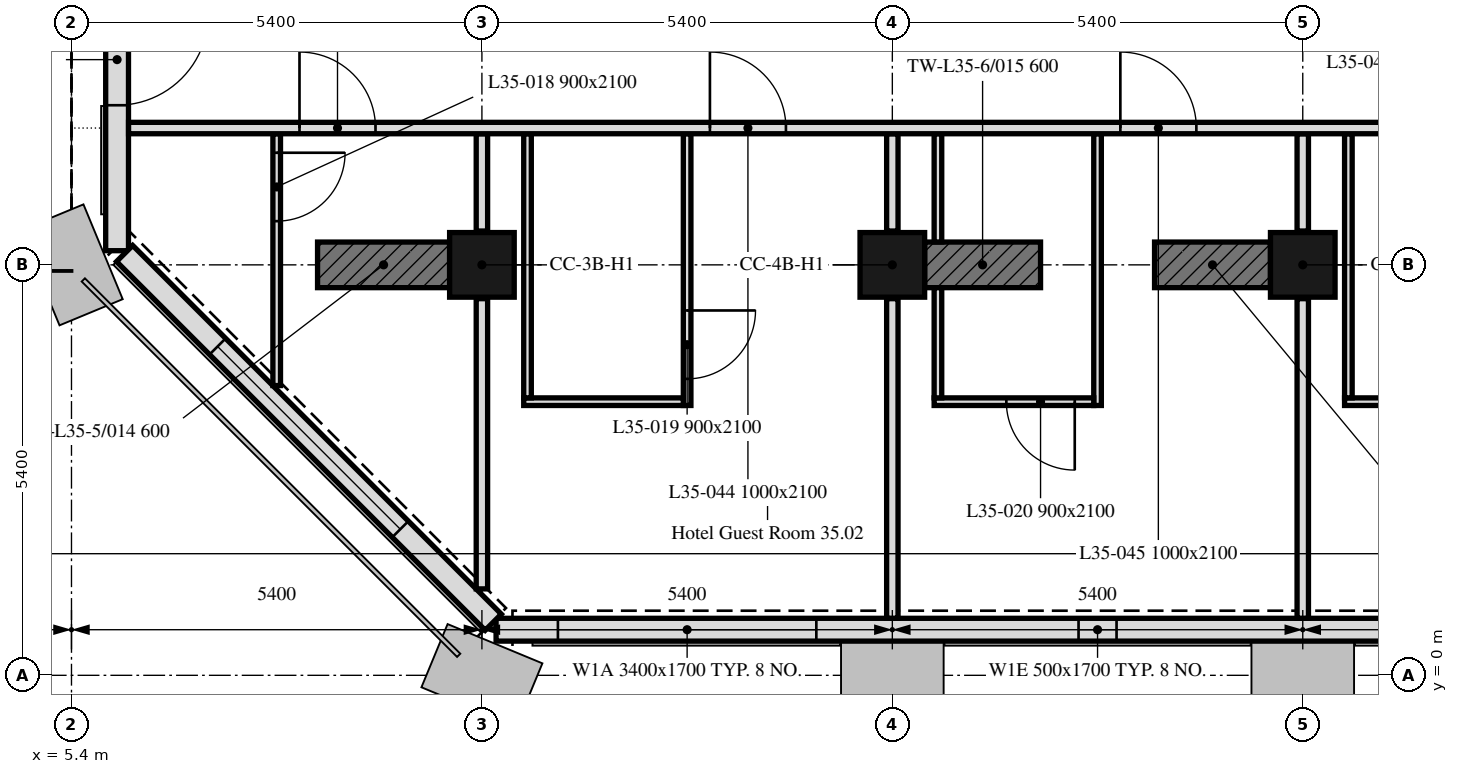
"""IFC4 building model, lengths in metres.
Left out: names, types, materials, properties, quantities, classifications, styles, units other than length and angle.
Written with IfcOpenShell. Run it as: python <this file> out.ifc"""

import sys

from ifc_helpers import new_model, si_unit, direction, frame, frame_2d, origin, origin_2d, place, context, subcontext, project, spatial, rectangle, extrude, element, fill, save


model = new_model("IFC4")
c1 = context("Model", 3, precision=1e-05, world=origin(), true_north=direction((0.0, 1.0)))
c2 = subcontext(c1, "Body", "Model", "MODEL_VIEW")
j1 = project(units=[si_unit("LENGTHUNIT", "METRE"), si_unit("PLANEANGLEUNIT", "RADIAN")], contexts=[c1])
p1 = place(None, origin())
s1 = spatial("IfcSite", under=j1, at=p1, CompositionType="ELEMENT")
p2 = place(p1, origin())
s2 = spatial("IfcBuilding", under=s1, at=p2, CompositionType="ELEMENT")
p3 = place(p2, frame((0.0, 0.0, 152.8)))
s3 = spatial("IfcBuildingStorey", under=s2, at=p3, CompositionType="ELEMENT", Elevation=152.8)
for number, where, z_axis, x_axis in (
    (1, (10.8, 5.4, 0.0), (0.0, 0.0, 1.0), (1.0, 0.0, 0.0)),
    (2, (16.2, 5.4, 0.0), (0.0, 0.0, 1.0), (1.0, 0.0, 0.0)),
    (3, (21.6, 5.4, 0.0), (0.0, 0.0, 1.0), (1.0, 0.0, 0.0)),
):
    element("IfcColumn", number, at=place(p3, frame(where, z_axis=z_axis, x_axis=x_axis)), inside=s3, PredefinedType="COLUMN", context=c2, shape_type="SweptSolid", body=[
        extrude(rectangle(XDim=0.85, YDim=0.85, at=origin_2d()), origin(), (0.0, 0.0, 1.0), 3.0),
    ])
p4 = place(p3, frame((8.637, 5.4, 0.0), z_axis=(0.0, 0.0, 1.0), x_axis=(1.0, 0.0, 0.0)))
e4 = element("IfcWall", 4, at=p4, inside=s3, PredefinedType="SHEAR", context=c2, shape_type="SweptSolid", body=[
    extrude(rectangle(XDim=1.738, YDim=0.6, at=frame_2d((0.869, 0.0))), origin(), (0.0, 0.0, 1.0), 3.0),
])
p5 = place(p3, frame((16.625, 5.4, 0.0), z_axis=(0.0, 0.0, 1.0), x_axis=(1.0, 0.0, 0.0)))
e5 = element("IfcWall", 5, at=p5, inside=s3, PredefinedType="SHEAR", context=c2, shape_type="SweptSolid", body=[
    extrude(rectangle(XDim=1.525, YDim=0.6, at=frame_2d((0.762, 0.0))), origin(), (0.0, 0.0, 1.0), 3.0),
])
p6 = place(p3, frame((19.65, 5.4, 0.0), z_axis=(0.0, 0.0, 1.0), x_axis=(1.0, 0.0, 0.0)))
e6 = element("IfcWall", 6, at=p6, inside=s3, PredefinedType="SHEAR", context=c2, shape_type="SweptSolid", body=[
    extrude(rectangle(XDim=1.525, YDim=0.6, at=frame_2d((0.763, 0.0))), origin(), (0.0, 0.0, 1.0), 3.0),
])
p7 = place(p3, frame((10.986, 0.6, 0.0), z_axis=(0.0, 0.0, 1.0), x_axis=(1.0, 0.0, 0.0)))
e7 = element("IfcWall", 7, at=p7, inside=s3, PredefinedType="SOLIDWALL", context=c2, shape_type="SweptSolid", body=[
    extrude(rectangle(XDim=32.027, YDim=0.3, at=frame_2d((16.014, 0.0))), origin(), (0.0, 0.0, 1.0), 3.0),
])
p8 = place(p7, frame((0.814, 0.0, 0.9)))
e8 = element("IfcOpeningElement", 8, at=p8, cuts=e7, PredefinedType="OPENING", context=c2, shape_type="SweptSolid", body=[
    extrude(rectangle(XDim=3.4, YDim=1.7, at=frame_2d((1.7, 0.85))), frame((0.0, 0.16, 0.0), z_axis=(0.0, -1.0, 0.0), x_axis=(1.0, 0.0, 0.0)), (0.0, 0.0, 1.0), 0.32),
])
p9 = place(p7, frame((7.664, 0.0, 0.9)))
e9 = element("IfcOpeningElement", 9, at=p9, cuts=e7, PredefinedType="OPENING", context=c2, shape_type="SweptSolid", body=[
    extrude(rectangle(XDim=0.5, YDim=1.7, at=frame_2d((0.25, 0.85))), frame((0.0, 0.16, 0.0), z_axis=(0.0, -1.0, 0.0), x_axis=(1.0, 0.0, 0.0)), (0.0, 0.0, 1.0), 0.32),
])
p10 = place(p7, frame((13.064, 0.0, 0.9)))
e10 = element("IfcOpeningElement", 10, at=p10, cuts=e7, PredefinedType="OPENING", context=c2, shape_type="SweptSolid", body=[
    extrude(rectangle(XDim=0.5, YDim=1.7, at=frame_2d((0.25, 0.85))), frame((0.0, 0.16, 0.0), z_axis=(0.0, -1.0, 0.0), x_axis=(1.0, 0.0, 0.0)), (0.0, 0.0, 1.0), 0.32),
])
p11 = place(p7, frame((18.464, 0.0, 0.9)))
e11 = element("IfcOpeningElement", 11, at=p11, cuts=e7, PredefinedType="OPENING", context=c2, shape_type="SweptSolid", body=[
    extrude(rectangle(XDim=0.5, YDim=1.7, at=frame_2d((0.25, 0.85))), frame((0.0, 0.16, 0.0), z_axis=(0.0, -1.0, 0.0), x_axis=(1.0, 0.0, 0.0)), (0.0, 0.0, 1.0), 0.32),
])
p12 = place(p7, frame((23.864, 0.0, 0.9)))
e12 = element("IfcOpeningElement", 12, at=p12, cuts=e7, PredefinedType="OPENING", context=c2, shape_type="SweptSolid", body=[
    extrude(rectangle(XDim=0.5, YDim=1.7, at=frame_2d((0.25, 0.85))), frame((0.0, 0.16, 0.0), z_axis=(0.0, -1.0, 0.0), x_axis=(1.0, 0.0, 0.0)), (0.0, 0.0, 1.0), 0.32),
])
p13 = place(p7, frame((28.164, 0.0, 0.9)))
e13 = element("IfcOpeningElement", 13, at=p13, cuts=e7, PredefinedType="OPENING", context=c2, shape_type="SweptSolid", body=[
    extrude(rectangle(XDim=1.1, YDim=1.7, at=frame_2d((0.55, 0.85))), frame((0.0, 0.16, 0.0), z_axis=(0.0, -1.0, 0.0), x_axis=(1.0, 0.0, 0.0)), (0.0, 0.0, 1.0), 0.32),
])
p14 = place(p3, frame((6.0, 16.2, 0.0), z_axis=(0.0, 0.0, 1.0), x_axis=(0.0, -1.0, 0.0)))
e14 = element("IfcWall", 14, at=p14, inside=s3, PredefinedType="SOLIDWALL", context=c2, shape_type="SweptSolid", body=[
    extrude(rectangle(XDim=10.614, YDim=0.3, at=frame_2d((5.307, 0.0))), origin(), (0.0, 0.0, 1.0), 3.0),
])
p15 = place(p14, frame((1.8, 0.0, 0.0)))
e15 = element("IfcOpeningElement", 15, at=p15, cuts=e14, PredefinedType="OPENING", context=c2, shape_type="SweptSolid", body=[
    extrude(rectangle(XDim=1.8, YDim=2.4, at=frame_2d((0.9, 1.2))), frame((0.0, 0.16, 0.0), z_axis=(0.0, -1.0, 0.0), x_axis=(1.0, 0.0, 0.0)), (0.0, 0.0, 1.0), 0.32),
])
p16 = place(p14, frame((7.5, 0.0, 0.0)))
e16 = element("IfcOpeningElement", 16, at=p16, cuts=e14, PredefinedType="OPENING", context=c2, shape_type="SweptSolid", body=[
    extrude(rectangle(XDim=1.2, YDim=2.4, at=frame_2d((0.6, 1.2))), frame((0.0, 0.16, 0.0), z_axis=(0.0, -1.0, 0.0), x_axis=(1.0, 0.0, 0.0)), (0.0, 0.0, 1.0), 0.32),
])
p17 = place(p3, frame((6.099, 5.55, 0.0), z_axis=(0.0, 0.0, 1.0), x_axis=(0.707106781187, -0.707106781187, 0.0)))
e17 = element("IfcWall", 17, at=p17, inside=s3, PredefinedType="SOLIDWALL", context=c2, shape_type="SweptSolid", body=[
    extrude(rectangle(XDim=6.86, YDim=0.3, at=frame_2d((3.43, 0.0))), origin(), (0.0, 0.0, 1.0), 3.0),
])
p18 = place(p17, frame((1.73, 0.0, 0.9)))
e18 = element("IfcOpeningElement", 18, at=p18, cuts=e17, PredefinedType="OPENING", context=c2, shape_type="SweptSolid", body=[
    extrude(rectangle(XDim=3.4, YDim=1.7, at=frame_2d((1.7, 0.85))), frame((0.0, 0.16, 0.0), z_axis=(0.0, -1.0, 0.0), x_axis=(1.0, 0.0, 0.0)), (0.0, 0.0, 1.0), 0.32),
])
p19 = place(p3, frame((8.1, 7.125, 0.0), z_axis=(0.0, 0.0, 1.0), x_axis=(0.0, -1.0, 0.0)))
e19 = element("IfcWall", 19, at=p19, inside=s3, PredefinedType="PARTITIONING", context=c2, shape_type="SweptSolid", body=[
    extrude(rectangle(XDim=3.313, YDim=0.1, at=frame_2d((1.656, 0.0))), origin(), (0.0, 0.0, 1.0), 3.0),
])
p20 = place(p19, frame((0.25, 0.0, 0.0)))
e20 = element("IfcOpeningElement", 20, at=p20, cuts=e19, PredefinedType="OPENING", context=c2, shape_type="SweptSolid", body=[
    extrude(rectangle(XDim=0.9, YDim=2.1, at=frame_2d((0.45, 1.05))), frame((0.0, 0.05, 0.0), z_axis=(0.0, -1.0, 0.0), x_axis=(1.0, 0.0, 0.0)), (0.0, 0.0, 1.0), 0.1),
])
p21 = place(p3, frame((10.8, 1.137, 0.0), z_axis=(0.0, 0.0, 1.0), x_axis=(0.0, 1.0, 0.0)))
e21 = element("IfcWall", 21, at=p21, inside=s3, PredefinedType="PARTITIONING", context=c2, shape_type="SweptSolid", body=[
    extrude(rectangle(XDim=3.818, YDim=0.15, at=frame_2d((1.909, 0.0))), origin(), (0.0, 0.0, 1.0), 3.0),
])
p22 = place(p3, frame((10.8, 5.845, 0.0), z_axis=(0.0, 0.0, 1.0), x_axis=(0.0, 1.0, 0.0)))
e22 = element("IfcWall", 22, at=p22, inside=s3, PredefinedType="PARTITIONING", context=c2, shape_type="SweptSolid", body=[
    extrude(rectangle(XDim=1.28, YDim=0.15, at=frame_2d((0.64, 0.0))), origin(), (0.0, 0.0, 1.0), 3.0),
])
p23 = place(p3, frame((16.2, 0.751, 0.0), z_axis=(0.0, 0.0, 1.0), x_axis=(0.0, 1.0, 0.0)))
e23 = element("IfcWall", 23, at=p23, inside=s3, PredefinedType="PARTITIONING", context=c2, shape_type="SweptSolid", body=[
    extrude(rectangle(XDim=4.204, YDim=0.15, at=frame_2d((2.102, 0.0))), origin(), (0.0, 0.0, 1.0), 2.4),
])
p24 = place(p3, frame((16.2, 5.845, 0.0), z_axis=(0.0, 0.0, 1.0), x_axis=(0.0, 1.0, 0.0)))
e24 = element("IfcWall", 24, at=p24, inside=s3, PredefinedType="PARTITIONING", context=c2, shape_type="SweptSolid", body=[
    extrude(rectangle(XDim=1.28, YDim=0.15, at=frame_2d((0.64, 0.0))), origin(), (0.0, 0.0, 1.0), 2.4),
])
p25 = place(p3, frame((13.5, 7.125, 0.0), z_axis=(0.0, 0.0, 1.0), x_axis=(0.0, -1.0, 0.0)))
e25 = element("IfcWall", 25, at=p25, inside=s3, PredefinedType="PARTITIONING", context=c2, shape_type="SweptSolid", body=[
    extrude(rectangle(XDim=3.575, YDim=0.1, at=frame_2d((1.788, 0.0))), origin(), (0.0, 0.0, 1.0), 3.0),
])
p26 = place(p25, frame((2.325, 0.0, 0.0)))
e26 = element("IfcOpeningElement", 26, at=p26, cuts=e25, PredefinedType="OPENING", context=c2, shape_type="SweptSolid", body=[
    extrude(rectangle(XDim=0.9, YDim=2.1, at=frame_2d((0.45, 1.05))), frame((0.0, 0.05, 0.0), z_axis=(0.0, -1.0, 0.0), x_axis=(1.0, 0.0, 0.0)), (0.0, 0.0, 1.0), 0.1),
])
p27 = place(p3, frame((13.45, 3.6, 0.0), z_axis=(0.0, 0.0, 1.0), x_axis=(-1.0, 0.0, 0.0)))
e27 = element("IfcWall", 27, at=p27, inside=s3, PredefinedType="PARTITIONING", context=c2, shape_type="SweptSolid", body=[
    extrude(rectangle(XDim=2.1, YDim=0.1, at=frame_2d((1.05, 0.0))), origin(), (0.0, 0.0, 1.0), 3.0),
])
p28 = place(p3, frame((11.4, 3.65, 0.0), z_axis=(0.0, 0.0, 1.0), x_axis=(0.0, 1.0, 0.0)))
e28 = element("IfcWall", 28, at=p28, inside=s3, PredefinedType="PARTITIONING", context=c2, shape_type="SweptSolid", body=[
    extrude(rectangle(XDim=3.475, YDim=0.1, at=frame_2d((1.738, 0.0))), origin(), (0.0, 0.0, 1.0), 3.0),
])
p29 = place(p3, frame((21.6, 0.751, 0.0), z_axis=(0.0, 0.0, 1.0), x_axis=(0.0, 1.0, 0.0)))
e29 = element("IfcWall", 29, at=p29, inside=s3, PredefinedType="PARTITIONING", context=c2, shape_type="SweptSolid", body=[
    extrude(rectangle(XDim=4.204, YDim=0.15, at=frame_2d((2.102, 0.0))), origin(), (0.0, 0.0, 1.0), 2.4),
])
p30 = place(p3, frame((21.6, 5.845, 0.0), z_axis=(0.0, 0.0, 1.0), x_axis=(0.0, 1.0, 0.0)))
e30 = element("IfcWall", 30, at=p30, inside=s3, PredefinedType="PARTITIONING", context=c2, shape_type="SweptSolid", body=[
    extrude(rectangle(XDim=1.28, YDim=0.15, at=frame_2d((0.64, 0.0))), origin(), (0.0, 0.0, 1.0), 2.4),
])
p31 = place(p3, frame((18.9, 7.125, 0.0), z_axis=(0.0, 0.0, 1.0), x_axis=(0.0, -1.0, 0.0)))
e31 = element("IfcWall", 31, at=p31, inside=s3, PredefinedType="PARTITIONING", context=c2, shape_type="SweptSolid", body=[
    extrude(rectangle(XDim=3.575, YDim=0.1, at=frame_2d((1.788, 0.0))), origin(), (0.0, 0.0, 1.0), 3.0),
])
p32 = place(p3, frame((18.85, 3.6, 0.0), z_axis=(0.0, 0.0, 1.0), x_axis=(-1.0, 0.0, 0.0)))
e32 = element("IfcWall", 32, at=p32, inside=s3, PredefinedType="PARTITIONING", context=c2, shape_type="SweptSolid", body=[
    extrude(rectangle(XDim=2.1, YDim=0.1, at=frame_2d((1.05, 0.0))), origin(), (0.0, 0.0, 1.0), 3.0),
])
p33 = place(p32, frame((0.25, 0.0, 0.0)))
e33 = element("IfcOpeningElement", 33, at=p33, cuts=e32, PredefinedType="OPENING", context=c2, shape_type="SweptSolid", body=[
    extrude(rectangle(XDim=0.9, YDim=2.1, at=frame_2d((0.45, 1.05))), frame((0.0, 0.05, 0.0), z_axis=(0.0, -1.0, 0.0), x_axis=(1.0, 0.0, 0.0)), (0.0, 0.0, 1.0), 0.1),
])
p34 = place(p3, frame((16.8, 3.65, 0.0), z_axis=(0.0, 0.0, 1.0), x_axis=(0.0, 1.0, 0.0)))
e34 = element("IfcWall", 34, at=p34, inside=s3, PredefinedType="PARTITIONING", context=c2, shape_type="SweptSolid", body=[
    extrude(rectangle(XDim=1.449, YDim=0.1, at=frame_2d((0.725, 0.0))), origin(), (0.0, 0.0, 1.0), 3.0),
])
p35 = place(p3, frame((16.8, 5.701, 0.0), z_axis=(0.0, 0.0, 1.0), x_axis=(0.0, 1.0, 0.0)))
e35 = element("IfcWall", 35, at=p35, inside=s3, PredefinedType="PARTITIONING", context=c2, shape_type="SweptSolid", body=[
    extrude(rectangle(XDim=1.424, YDim=0.1, at=frame_2d((0.712, 0.0))), origin(), (0.0, 0.0, 1.0), 3.0),
])
p36 = place(p3, frame((24.25, 3.6, 0.0), z_axis=(0.0, 0.0, 1.0), x_axis=(-1.0, 0.0, 0.0)))
e36 = element("IfcWall", 36, at=p36, inside=s3, PredefinedType="PARTITIONING", context=c2, shape_type="SweptSolid", body=[
    extrude(rectangle(XDim=2.1, YDim=0.1, at=frame_2d((1.05, 0.0))), origin(), (0.0, 0.0, 1.0), 3.0),
])
p37 = place(p3, frame((22.2, 3.65, 0.0), z_axis=(0.0, 0.0, 1.0), x_axis=(0.0, 1.0, 0.0)))
e37 = element("IfcWall", 37, at=p37, inside=s3, PredefinedType="PARTITIONING", context=c2, shape_type="SweptSolid", body=[
    extrude(rectangle(XDim=3.475, YDim=0.1, at=frame_2d((1.738, 0.0))), origin(), (0.0, 0.0, 1.0), 3.0),
])
p38 = place(p3, frame((6.151, 7.2, 0.0), z_axis=(0.0, 0.0, 1.0), x_axis=(1.0, 0.0, 0.0)))
e38 = element("IfcWall", 38, at=p38, inside=s3, PredefinedType="PARTITIONING", context=c2, shape_type="SweptSolid", body=[
    extrude(rectangle(XDim=41.698, YDim=0.15, at=frame_2d((20.849, 0.0))), origin(), (0.0, 0.0, 1.0), 2.4),
])
p39 = place(p38, frame((2.249, 0.0, 0.0)))
e39 = element("IfcOpeningElement", 39, at=p39, cuts=e38, PredefinedType="OPENING", context=c2, shape_type="SweptSolid", body=[
    extrude(rectangle(XDim=1.0, YDim=2.1, at=frame_2d((0.5, 1.05))), frame((0.0, 0.075, 0.0), z_axis=(0.0, -1.0, 0.0), x_axis=(1.0, 0.0, 0.0)), (0.0, 0.0, 1.0), 0.15),
])
p40 = place(p38, frame((7.649, 0.0, 0.0)))
e40 = element("IfcOpeningElement", 40, at=p40, cuts=e38, PredefinedType="OPENING", context=c2, shape_type="SweptSolid", body=[
    extrude(rectangle(XDim=1.0, YDim=2.1, at=frame_2d((0.5, 1.05))), frame((0.0, 0.075, 0.0), z_axis=(0.0, -1.0, 0.0), x_axis=(1.0, 0.0, 0.0)), (0.0, 0.0, 1.0), 0.15),
])
p41 = place(p38, frame((13.049, 0.0, 0.0)))
e41 = element("IfcOpeningElement", 41, at=p41, cuts=e38, PredefinedType="OPENING", context=c2, shape_type="SweptSolid", body=[
    extrude(rectangle(XDim=1.0, YDim=2.1, at=frame_2d((0.5, 1.05))), frame((0.0, 0.075, 0.0), z_axis=(0.0, -1.0, 0.0), x_axis=(1.0, 0.0, 0.0)), (0.0, 0.0, 1.0), 0.15),
])
p42 = place(p38, frame((18.449, 0.0, 0.0)))
e42 = element("IfcOpeningElement", 42, at=p42, cuts=e38, PredefinedType="OPENING", context=c2, shape_type="SweptSolid", body=[
    extrude(rectangle(XDim=1.0, YDim=2.1, at=frame_2d((0.5, 1.05))), frame((0.0, 0.075, 0.0), z_axis=(0.0, -1.0, 0.0), x_axis=(1.0, 0.0, 0.0)), (0.0, 0.0, 1.0), 0.15),
])
p43 = place(p38, frame((23.849, 0.0, 0.0)))
e43 = element("IfcOpeningElement", 43, at=p43, cuts=e38, PredefinedType="OPENING", context=c2, shape_type="SweptSolid", body=[
    extrude(rectangle(XDim=1.0, YDim=2.1, at=frame_2d((0.5, 1.05))), frame((0.0, 0.075, 0.0), z_axis=(0.0, -1.0, 0.0), x_axis=(1.0, 0.0, 0.0)), (0.0, 0.0, 1.0), 0.15),
])
p44 = place(p38, frame((29.249, 0.0, 0.0)))
e44 = element("IfcOpeningElement", 44, at=p44, cuts=e38, PredefinedType="OPENING", context=c2, shape_type="SweptSolid", body=[
    extrude(rectangle(XDim=1.0, YDim=2.1, at=frame_2d((0.5, 1.05))), frame((0.0, 0.075, 0.0), z_axis=(0.0, -1.0, 0.0), x_axis=(1.0, 0.0, 0.0)), (0.0, 0.0, 1.0), 0.15),
])
p45 = place(p38, frame((37.954, 0.0, 0.0)))
e45 = element("IfcOpeningElement", 45, at=p45, cuts=e38, PredefinedType="OPENING", context=c2, shape_type="SweptSolid", body=[
    extrude(rectangle(XDim=1.0, YDim=2.1, at=frame_2d((0.5, 1.05))), frame((0.0, 0.075, 0.0), z_axis=(0.0, -1.0, 0.0), x_axis=(1.0, 0.0, 0.0)), (0.0, 0.0, 1.0), 0.15),
])
p46 = place(p16, origin())
e46 = element("IfcDoor", 46, at=p46, inside=s3, OperationType="SINGLE_SWING_LEFT", PredefinedType="DOOR", context=c2, shape_type="SweptSolid", body=[
    extrude(rectangle(XDim=1.2, YDim=2.4, at=frame_2d((0.6, 1.2))), frame((0.0, 0.025, 0.0), z_axis=(0.0, -1.0, 0.0), x_axis=(1.0, 0.0, 0.0)), (0.0, 0.0, 1.0), 0.05),
])
fill(e16, e46)
p47 = place(p8, origin())
e47 = element("IfcWindow", 47, at=p47, inside=s3, PartitioningType="SINGLE_PANEL", PredefinedType="WINDOW", context=c2, shape_type="SweptSolid", body=[
    extrude(rectangle(XDim=3.4, YDim=1.7, at=frame_2d((1.7, 0.85))), frame((0.0, 0.03, 0.0), z_axis=(0.0, -1.0, 0.0), x_axis=(1.0, 0.0, 0.0)), (0.0, 0.0, 1.0), 0.06),
])
fill(e8, e47)
p48 = place(p9, origin())
e48 = element("IfcWindow", 48, at=p48, inside=s3, PartitioningType="SINGLE_PANEL", PredefinedType="WINDOW", context=c2, shape_type="SweptSolid", body=[
    extrude(rectangle(XDim=0.5, YDim=1.7, at=frame_2d((0.25, 0.85))), frame((0.0, 0.03, 0.0), z_axis=(0.0, -1.0, 0.0), x_axis=(1.0, 0.0, 0.0)), (0.0, 0.0, 1.0), 0.06),
])
fill(e9, e48)
p49 = place(p18, origin())
e49 = element("IfcWindow", 49, at=p49, inside=s3, PartitioningType="SINGLE_PANEL", PredefinedType="WINDOW", context=c2, shape_type="SweptSolid", body=[
    extrude(rectangle(XDim=3.4, YDim=1.7, at=frame_2d((1.7, 0.85))), frame((0.0, 0.03, 0.0), z_axis=(0.0, -1.0, 0.0), x_axis=(1.0, 0.0, 0.0)), (0.0, 0.0, 1.0), 0.06),
])
fill(e18, e49)
p50 = place(p20, origin())
e50 = element("IfcDoor", 50, at=p50, inside=s3, OperationType="SINGLE_SWING_LEFT", PredefinedType="DOOR", context=c2, shape_type="SweptSolid", body=[
    extrude(rectangle(XDim=0.9, YDim=2.1, at=frame_2d((0.45, 1.05))), frame((0.0, 0.025, 0.0), z_axis=(0.0, -1.0, 0.0), x_axis=(1.0, 0.0, 0.0)), (0.0, 0.0, 1.0), 0.05),
])
fill(e20, e50)
p51 = place(p26, origin())
e51 = element("IfcDoor", 51, at=p51, inside=s3, OperationType="SINGLE_SWING_LEFT", PredefinedType="DOOR", context=c2, shape_type="SweptSolid", body=[
    extrude(rectangle(XDim=0.9, YDim=2.1, at=frame_2d((0.45, 1.05))), frame((0.0, 0.025, 0.0), z_axis=(0.0, -1.0, 0.0), x_axis=(1.0, 0.0, 0.0)), (0.0, 0.0, 1.0), 0.05),
])
fill(e26, e51)
p52 = place(p33, origin())
e52 = element("IfcDoor", 52, at=p52, inside=s3, OperationType="SINGLE_SWING_RIGHT", PredefinedType="DOOR", context=c2, shape_type="SweptSolid", body=[
    extrude(rectangle(XDim=0.9, YDim=2.1, at=frame_2d((0.45, 1.05))), frame((0.0, 0.025, 0.0), z_axis=(0.0, -1.0, 0.0), x_axis=(1.0, 0.0, 0.0)), (0.0, 0.0, 1.0), 0.05),
])
fill(e33, e52)
p53 = place(p39, origin())
e53 = element("IfcDoor", 53, at=p53, inside=s3, OperationType="SINGLE_SWING_LEFT", PredefinedType="DOOR", context=c2, shape_type="SweptSolid", body=[
    extrude(rectangle(XDim=1.0, YDim=2.1, at=frame_2d((0.5, 1.05))), frame((0.0, 0.025, 0.0), z_axis=(0.0, -1.0, 0.0), x_axis=(1.0, 0.0, 0.0)), (0.0, 0.0, 1.0), 0.05),
])
fill(e39, e53)
p54 = place(p40, origin())
e54 = element("IfcDoor", 54, at=p54, inside=s3, OperationType="SINGLE_SWING_RIGHT", PredefinedType="DOOR", context=c2, shape_type="SweptSolid", body=[
    extrude(rectangle(XDim=1.0, YDim=2.1, at=frame_2d((0.5, 1.05))), frame((0.0, 0.025, 0.0), z_axis=(0.0, -1.0, 0.0), x_axis=(1.0, 0.0, 0.0)), (0.0, 0.0, 1.0), 0.05),
])
fill(e40, e54)
p55 = place(p41, origin())
e55 = element("IfcDoor", 55, at=p55, inside=s3, OperationType="SINGLE_SWING_RIGHT", PredefinedType="DOOR", context=c2, shape_type="SweptSolid", body=[
    extrude(rectangle(XDim=1.0, YDim=2.1, at=frame_2d((0.5, 1.05))), frame((0.0, 0.025, 0.0), z_axis=(0.0, -1.0, 0.0), x_axis=(1.0, 0.0, 0.0)), (0.0, 0.0, 1.0), 0.05),
])
fill(e41, e55)
save(model, sys.argv[1])
